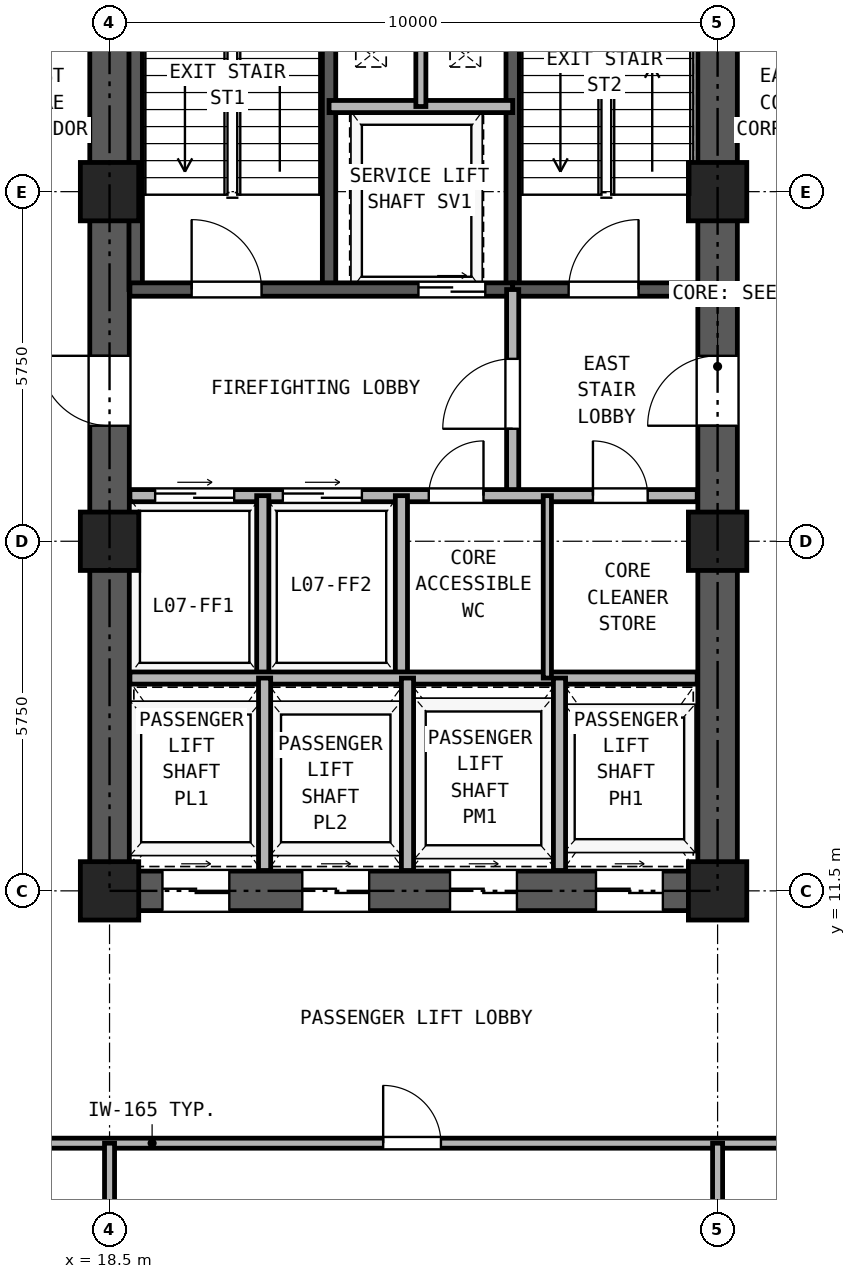
"""IFC4 building model, lengths in metres.
Left out: names, types, materials, properties, quantities, classifications, styles, units other than length and angle.
Written with IfcOpenShell. Run it as: python <this file> out.ifc"""

import sys

from ifc_helpers import new_model, si_unit, direction, frame, frame_2d, origin, origin_2d, place, context, subcontext, project, spatial, rectangle, hollow_rectangle, extrude, source, transform, mapped, element, fill, save


model = new_model("IFC4")
c1 = context("Model", 3, precision=1e-05, world=origin(), true_north=direction((0.0, 1.0)))
c2 = subcontext(c1, "Body", "Model", "MODEL_VIEW")
j1 = project(units=[si_unit("LENGTHUNIT", "METRE"), si_unit("PLANEANGLEUNIT", "RADIAN")], contexts=[c1])
p1 = place(None, origin())
s1 = spatial("IfcSite", under=j1, at=p1, CompositionType="ELEMENT")
p2 = place(p1, origin())
s2 = spatial("IfcBuilding", under=s1, at=p2, CompositionType="ELEMENT")
p3 = place(p2, frame((0.0, 0.0, 29.7)))
s3 = spatial("IfcBuildingStorey", under=s2, at=p3, CompositionType="ELEMENT", Elevation=29.7)
m1 = source(origin(), c2, "Body", "SweptSolid", [
    extrude(hollow_rectangle(XDim=0.96, YDim=0.96, WallThickness=0.06, at=origin_2d()), origin(), (0.0, 0.0, 1.0), 3.32),
])
for number, where, z_axis, x_axis in (
    (1, (18.5, 11.5, 0.0), (0.0, 0.0, 1.0), (1.0, 0.0, 0.0)),
    (2, (18.5, 17.25, 0.0), (0.0, 0.0, 1.0), (1.0, 0.0, 0.0)),
    (3, (18.5, 23.0, 0.0), (0.0, 0.0, 1.0), (1.0, 0.0, 0.0)),
    (4, (28.5, 11.5, 0.0), (0.0, 0.0, 1.0), (1.0, 0.0, 0.0)),
    (5, (28.5, 17.25, 0.0), (0.0, 0.0, 1.0), (1.0, 0.0, 0.0)),
    (6, (28.5, 23.0, 0.0), (0.0, 0.0, 1.0), (1.0, 0.0, 0.0)),
):
    element("IfcColumn", number, at=place(p3, frame(where, z_axis=z_axis, x_axis=x_axis)), inside=s3, PredefinedType="COLUMN", context=c2, shape_type="MappedRepresentation", body=[
        mapped(m1, transform((0.0, 0.0, 0.0), x_axis=(1.0, 0.0, 0.0), y_axis=(0.0, 1.0, 0.0), z_axis=(0.0, 0.0, 1.0), scale=1.0)),
    ])
p4 = place(p3, frame((18.175, 11.5, 0.0), z_axis=(0.0, 0.0, 1.0), x_axis=(1.0, 0.0, 0.0)))
e7 = element("IfcWall", 7, at=p4, inside=s3, PredefinedType="SHEAR", context=c2, shape_type="SweptSolid", body=[
    extrude(rectangle(XDim=10.65, YDim=0.65, at=frame_2d((5.325, 0.0))), origin(), (0.0, 0.0, 1.0), 3.32),
])
p5 = place(p4, frame((1.195, 0.0, 0.0)))
e8 = element("IfcOpeningElement", 8, at=p5, cuts=e7, PredefinedType="OPENING", context=c2, shape_type="SweptSolid", body=[
    extrude(rectangle(XDim=1.1, YDim=2.25, at=frame_2d((0.55, 1.125))), frame((0.0, 0.335, 0.0), z_axis=(0.0, -1.0, 0.0), x_axis=(1.0, 0.0, 0.0)), (0.0, 0.0, 1.0), 0.67),
])
p6 = place(p4, frame((3.495, 0.0, 0.0)))
e9 = element("IfcOpeningElement", 9, at=p6, cuts=e7, PredefinedType="OPENING", context=c2, shape_type="SweptSolid", body=[
    extrude(rectangle(XDim=1.1, YDim=2.25, at=frame_2d((0.55, 1.125))), frame((0.0, 0.335, 0.0), z_axis=(0.0, -1.0, 0.0), x_axis=(1.0, 0.0, 0.0)), (0.0, 0.0, 1.0), 0.67),
])
p7 = place(p4, frame((5.925, 0.0, 0.0)))
e10 = element("IfcOpeningElement", 10, at=p7, cuts=e7, PredefinedType="OPENING", context=c2, shape_type="SweptSolid", body=[
    extrude(rectangle(XDim=1.1, YDim=2.25, at=frame_2d((0.55, 1.125))), frame((0.0, 0.335, 0.0), z_axis=(0.0, -1.0, 0.0), x_axis=(1.0, 0.0, 0.0)), (0.0, 0.0, 1.0), 0.67),
])
p8 = place(p4, frame((8.325, 0.0, 0.0)))
e11 = element("IfcOpeningElement", 11, at=p8, cuts=e7, PredefinedType="OPENING", context=c2, shape_type="SweptSolid", body=[
    extrude(rectangle(XDim=1.1, YDim=2.25, at=frame_2d((0.55, 1.125))), frame((0.0, 0.335, 0.0), z_axis=(0.0, -1.0, 0.0), x_axis=(1.0, 0.0, 0.0)), (0.0, 0.0, 1.0), 0.67),
])
p9 = place(p3, frame((18.5, 11.825, 0.0), z_axis=(0.0, 0.0, 1.0), x_axis=(0.0, 1.0, 0.0)))
e12 = element("IfcWall", 12, at=p9, inside=s3, PredefinedType="SHEAR", context=c2, shape_type="SweptSolid", body=[
    extrude(rectangle(XDim=16.6, YDim=0.65, at=frame_2d((8.3, 0.0))), origin(), (0.0, 0.0, 1.0), 3.32),
])
p10 = place(p9, frame((7.325, 0.0, 0.0)))
e13 = element("IfcOpeningElement", 13, at=p10, cuts=e12, PredefinedType="OPENING", context=c2, shape_type="SweptSolid", body=[
    extrude(rectangle(XDim=1.15, YDim=2.2, at=frame_2d((0.575, 1.1))), frame((0.0, 0.335, 0.0), z_axis=(0.0, -1.0, 0.0), x_axis=(1.0, 0.0, 0.0)), (0.0, 0.0, 1.0), 0.67),
])
p11 = place(p3, frame((28.5, 11.825, 0.0), z_axis=(0.0, 0.0, 1.0), x_axis=(0.0, 1.0, 0.0)))
e14 = element("IfcWall", 14, at=p11, inside=s3, PredefinedType="SHEAR", context=c2, shape_type="SweptSolid", body=[
    extrude(rectangle(XDim=16.6, YDim=0.65, at=frame_2d((8.3, 0.0))), origin(), (0.0, 0.0, 1.0), 3.32),
])
p12 = place(p11, frame((7.325, 0.0, 0.0)))
e15 = element("IfcOpeningElement", 15, at=p12, cuts=e14, PredefinedType="OPENING", context=c2, shape_type="SweptSolid", body=[
    extrude(rectangle(XDim=1.15, YDim=2.2, at=frame_2d((0.575, 1.1))), frame((0.0, 0.335, 0.0), z_axis=(0.0, -1.0, 0.0), x_axis=(1.0, 0.0, 0.0)), (0.0, 0.0, 1.0), 0.67),
])
for number, where, z_axis, x_axis in (
    (16, (18.93, 21.39, 0.0), (0.0, 0.0, 1.0), (0.0, 1.0, 0.0)),
    (17, (22.11, 21.39, 0.0), (0.0, 0.0, 1.0), (0.0, 1.0, 0.0)),
    (18, (25.13, 21.39, 0.0), (0.0, 0.0, 1.0), (0.0, 1.0, 0.0)),
):
    element("IfcWall", number, at=place(p3, frame(where, z_axis=z_axis, x_axis=x_axis)), inside=s3, PredefinedType="SOLIDWALL", context=c2, shape_type="SweptSolid", body=[
        extrude(rectangle(XDim=7.11, YDim=0.22, at=frame_2d((3.555, 0.0))), origin(), (0.0, 0.0, 1.0), 3.32),
    ])
p13 = place(p3, frame((18.835, 21.39, 0.0), z_axis=(0.0, 0.0, 1.0), x_axis=(1.0, 0.0, 0.0)))
e19 = element("IfcWall", 19, at=p13, inside=s3, PredefinedType="SOLIDWALL", context=c2, shape_type="SweptSolid", body=[
    extrude(rectangle(XDim=6.295, YDim=0.22, at=frame_2d((3.147, 0.0))), origin(), (0.0, 0.0, 1.0), 3.32),
])
p14 = place(p13, frame((1.015, 0.0, 0.0)))
e20 = element("IfcOpeningElement", 20, at=p14, cuts=e19, PredefinedType="OPENING", context=c2, shape_type="SweptSolid", body=[
    extrude(rectangle(XDim=1.15, YDim=2.2, at=frame_2d((0.575, 1.1))), frame((0.0, 0.12, 0.0), z_axis=(0.0, -1.0, 0.0), x_axis=(1.0, 0.0, 0.0)), (0.0, 0.0, 1.0), 0.24),
])
p15 = place(p13, frame((4.745, 0.0, 0.0)))
e21 = element("IfcOpeningElement", 21, at=p15, cuts=e19, PredefinedType="OPENING", context=c2, shape_type="SweptSolid", body=[
    extrude(rectangle(XDim=1.1, YDim=2.25, at=frame_2d((0.55, 1.125))), frame((0.0, 0.12, 0.0), z_axis=(0.0, -1.0, 0.0), x_axis=(1.0, 0.0, 0.0)), (0.0, 0.0, 1.0), 0.24),
])
p16 = place(p3, frame((25.13, 21.39, 0.0), z_axis=(0.0, 0.0, 1.0), x_axis=(1.0, 0.0, 0.0)))
e22 = element("IfcWall", 22, at=p16, inside=s3, PredefinedType="SOLIDWALL", context=c2, shape_type="SweptSolid", body=[
    extrude(rectangle(XDim=3.035, YDim=0.22, at=frame_2d((1.518, 0.0))), origin(), (0.0, 0.0, 1.0), 3.32),
])
p17 = place(p16, frame((0.92, 0.0, 0.0)))
e23 = element("IfcOpeningElement", 23, at=p17, cuts=e22, PredefinedType="OPENING", context=c2, shape_type="SweptSolid", body=[
    extrude(rectangle(XDim=1.15, YDim=2.2, at=frame_2d((0.575, 1.1))), frame((0.0, 0.12, 0.0), z_axis=(0.0, -1.0, 0.0), x_axis=(1.0, 0.0, 0.0)), (0.0, 0.0, 1.0), 0.24),
])
p18 = place(p3, frame((22.11, 24.4, 0.0), z_axis=(0.0, 0.0, 1.0), x_axis=(1.0, 0.0, 0.0)))
e24 = element("IfcWall", 24, at=p18, inside=s3, PredefinedType="PARTITIONING", context=c2, shape_type="SweptSolid", body=[
    extrude(rectangle(XDim=3.02, YDim=0.2, at=frame_2d((1.51, 0.0))), origin(), (0.0, 0.0, 1.0), 3.32),
])
p19 = place(p3, frame((23.62, 24.4, 0.0), z_axis=(0.0, 0.0, 1.0), x_axis=(0.0, 1.0, 0.0)))
e25 = element("IfcWall", 25, at=p19, inside=s3, PredefinedType="PARTITIONING", context=c2, shape_type="SweptSolid", body=[
    extrude(rectangle(XDim=4.015, YDim=0.165, at=frame_2d((2.008, 0.0))), origin(), (0.0, 0.0, 1.0), 3.32),
])
p20 = place(p3, frame((25.13, 18.0, 0.0), z_axis=(0.0, 0.0, 1.0), x_axis=(0.0, 1.0, 0.0)))
e26 = element("IfcWall", 26, at=p20, inside=s3, PredefinedType="PARTITIONING", context=c2, shape_type="SweptSolid", body=[
    extrude(rectangle(XDim=3.39, YDim=0.2, at=frame_2d((1.695, 0.0))), origin(), (0.0, 0.0, 1.0), 3.32),
])
p21 = place(p20, frame((1.1, 0.0, 0.0)))
e27 = element("IfcOpeningElement", 27, at=p21, cuts=e26, PredefinedType="OPENING", context=c2, shape_type="SweptSolid", body=[
    extrude(rectangle(XDim=1.15, YDim=2.2, at=frame_2d((0.575, 1.1))), frame((0.0, 0.11, 0.0), z_axis=(0.0, -1.0, 0.0), x_axis=(1.0, 0.0, 0.0)), (0.0, 0.0, 1.0), 0.22),
])
p22 = place(p3, frame((18.835, 18.0, 0.0), z_axis=(0.0, 0.0, 1.0), x_axis=(1.0, 0.0, 0.0)))
e28 = element("IfcWall", 28, at=p22, inside=s3, PredefinedType="PARTITIONING", context=c2, shape_type="SweptSolid", body=[
    extrude(rectangle(XDim=9.33, YDim=0.2, at=frame_2d((4.665, 0.0))), origin(), (0.0, 0.0, 1.0), 3.32),
])
p23 = place(p22, frame((0.415, 0.0, 0.0)))
e29 = element("IfcOpeningElement", 29, at=p23, cuts=e28, PredefinedType="OPENING", context=c2, shape_type="SweptSolid", body=[
    extrude(rectangle(XDim=1.3, YDim=2.3, at=frame_2d((0.65, 1.15))), frame((0.0, 0.11, 0.0), z_axis=(0.0, -1.0, 0.0), x_axis=(1.0, 0.0, 0.0)), (0.0, 0.0, 1.0), 0.22),
])
p24 = place(p22, frame((2.515, 0.0, 0.0)))
e30 = element("IfcOpeningElement", 30, at=p24, cuts=e28, PredefinedType="OPENING", context=c2, shape_type="SweptSolid", body=[
    extrude(rectangle(XDim=1.3, YDim=2.3, at=frame_2d((0.65, 1.15))), frame((0.0, 0.11, 0.0), z_axis=(0.0, -1.0, 0.0), x_axis=(1.0, 0.0, 0.0)), (0.0, 0.0, 1.0), 0.22),
])
p25 = place(p22, frame((4.915, 0.0, 0.0)))
e31 = element("IfcOpeningElement", 31, at=p25, cuts=e28, PredefinedType="OPENING", context=c2, shape_type="SweptSolid", body=[
    extrude(rectangle(XDim=0.9, YDim=2.05, at=frame_2d((0.45, 1.025))), frame((0.0, 0.11, 0.0), z_axis=(0.0, -1.0, 0.0), x_axis=(1.0, 0.0, 0.0)), (0.0, 0.0, 1.0), 0.22),
])
p26 = place(p22, frame((7.615, 0.0, 0.0)))
e32 = element("IfcOpeningElement", 32, at=p26, cuts=e28, PredefinedType="OPENING", context=c2, shape_type="SweptSolid", body=[
    extrude(rectangle(XDim=0.9, YDim=2.05, at=frame_2d((0.45, 1.025))), frame((0.0, 0.11, 0.0), z_axis=(0.0, -1.0, 0.0), x_axis=(1.0, 0.0, 0.0)), (0.0, 0.0, 1.0), 0.22),
])
for number, where, z_axis, x_axis in (
    (33, (21.02, 15.0, 0.0), (0.0, 0.0, 1.0), (0.0, 1.0, 0.0)),
    (34, (23.3, 15.0, 0.0), (0.0, 0.0, 1.0), (0.0, 1.0, 0.0)),
):
    element("IfcWall", number, at=place(p3, frame(where, z_axis=z_axis, x_axis=x_axis)), inside=s3, PredefinedType="PARTITIONING", context=c2, shape_type="SweptSolid", body=[
        extrude(rectangle(XDim=3.0, YDim=0.2, at=frame_2d((1.5, 0.0))), origin(), (0.0, 0.0, 1.0), 3.32),
    ])
p27 = place(p3, frame((18.835, 15.0, 0.0), z_axis=(0.0, 0.0, 1.0), x_axis=(1.0, 0.0, 0.0)))
e35 = element("IfcWall", 35, at=p27, inside=s3, PredefinedType="PARTITIONING", context=c2, shape_type="SweptSolid", body=[
    extrude(rectangle(XDim=9.33, YDim=0.2, at=frame_2d((4.665, 0.0))), origin(), (0.0, 0.0, 1.0), 3.32),
])
p28 = place(p3, frame((25.7, 15.0, 0.0), z_axis=(0.0, 0.0, 1.0), x_axis=(0.0, 1.0, 0.0)))
e36 = element("IfcWall", 36, at=p28, inside=s3, PredefinedType="PARTITIONING", context=c2, shape_type="SweptSolid", body=[
    extrude(rectangle(XDim=3.0, YDim=0.135, at=frame_2d((1.5, 0.0))), origin(), (0.0, 0.0, 1.0), 3.32),
])
for number, where, z_axis, x_axis in (
    (37, (21.05, 11.835, 0.0), (0.0, 0.0, 1.0), (0.0, 1.0, 0.0)),
    (38, (23.4, 11.835, 0.0), (0.0, 0.0, 1.0), (0.0, 1.0, 0.0)),
    (39, (25.9, 11.835, 0.0), (0.0, 0.0, 1.0), (0.0, 1.0, 0.0)),
):
    element("IfcWall", number, at=place(p3, frame(where, z_axis=z_axis, x_axis=x_axis)), inside=s3, PredefinedType="PARTITIONING", context=c2, shape_type="SweptSolid", body=[
        extrude(rectangle(XDim=3.165, YDim=0.2, at=frame_2d((1.583, 0.0))), origin(), (0.0, 0.0, 1.0), 3.32),
    ])
p29 = place(p3, frame((11.4, 7.35, 0.0), z_axis=(0.0, 0.0, 1.0), x_axis=(1.0, 0.0, 0.0)))
e40 = element("IfcWall", 40, at=p29, inside=s3, PredefinedType="PARTITIONING", context=c2, shape_type="SweptSolid", body=[
    extrude(rectangle(XDim=24.2, YDim=0.165, at=frame_2d((12.1, 0.0))), origin(), (0.0, 0.0, 1.0), 3.32),
])
p30 = place(p29, frame((3.05, 0.0, 0.0)))
e41 = element("IfcOpeningElement", 41, at=p30, cuts=e40, PredefinedType="OPENING", context=c2, shape_type="SweptSolid", body=[
    extrude(rectangle(XDim=0.95, YDim=2.15, at=frame_2d((0.475, 1.075))), frame((0.0, 0.093, 0.0), z_axis=(0.0, -1.0, 0.0), x_axis=(1.0, 0.0, 0.0)), (0.0, 0.0, 1.0), 0.185),
])
p31 = place(p29, frame((11.6, 0.0, 0.0)))
e42 = element("IfcOpeningElement", 42, at=p31, cuts=e40, PredefinedType="OPENING", context=c2, shape_type="SweptSolid", body=[
    extrude(rectangle(XDim=0.95, YDim=2.15, at=frame_2d((0.475, 1.075))), frame((0.0, 0.093, 0.0), z_axis=(0.0, -1.0, 0.0), x_axis=(1.0, 0.0, 0.0)), (0.0, 0.0, 1.0), 0.185),
])
p32 = place(p29, frame((18.8, 0.0, 0.0)))
e43 = element("IfcOpeningElement", 43, at=p32, cuts=e40, PredefinedType="OPENING", context=c2, shape_type="SweptSolid", body=[
    extrude(rectangle(XDim=0.92, YDim=2.1, at=frame_2d((0.46, 1.05))), frame((0.0, 0.093, 0.0), z_axis=(0.0, -1.0, 0.0), x_axis=(1.0, 0.0, 0.0)), (0.0, 0.0, 1.0), 0.185),
])
p33 = place(p29, frame((22.35, 0.0, 0.0)))
e44 = element("IfcOpeningElement", 44, at=p33, cuts=e40, PredefinedType="OPENING", context=c2, shape_type="SweptSolid", body=[
    extrude(rectangle(XDim=0.92, YDim=2.1, at=frame_2d((0.46, 1.05))), frame((0.0, 0.093, 0.0), z_axis=(0.0, -1.0, 0.0), x_axis=(1.0, 0.0, 0.0)), (0.0, 0.0, 1.0), 0.185),
])
for number, where, z_axis, x_axis in (
    (45, (18.5, 0.16, 0.0), (0.0, 0.0, 1.0), (0.0, 1.0, 0.0)),
    (46, (28.5, 0.16, 0.0), (0.0, 0.0, 1.0), (0.0, 1.0, 0.0)),
):
    element("IfcWall", number, at=place(p3, frame(where, z_axis=z_axis, x_axis=x_axis)), inside=s3, PredefinedType="PARTITIONING", context=c2, shape_type="SweptSolid", body=[
        extrude(rectangle(XDim=7.19, YDim=0.165, at=frame_2d((3.595, 0.0))), origin(), (0.0, 0.0, 1.0), 2.539),
    ])
p34 = place(p14, frame((1.15, 0.0, 0.0), z_axis=(0.0, 0.0, 1.0), x_axis=(-1.0, 0.0, 0.0)))
e47 = element("IfcDoor", 47, at=p34, inside=s3, OperationType="SINGLE_SWING_LEFT", PredefinedType="DOOR", context=c2, shape_type="SweptSolid", body=[
    extrude(rectangle(XDim=1.15, YDim=2.2, at=frame_2d((0.575, 1.1))), frame((0.0, 0.025, 0.0), z_axis=(0.0, -1.0, 0.0), x_axis=(1.0, 0.0, 0.0)), (0.0, 0.0, 1.0), 0.05),
])
fill(e20, e47)
p35 = place(p17, frame((1.15, 0.0, 0.0), z_axis=(0.0, 0.0, 1.0), x_axis=(-1.0, 0.0, 0.0)))
e48 = element("IfcDoor", 48, at=p35, inside=s3, OperationType="SINGLE_SWING_RIGHT", PredefinedType="DOOR", context=c2, shape_type="SweptSolid", body=[
    extrude(rectangle(XDim=1.15, YDim=2.2, at=frame_2d((0.575, 1.1))), frame((0.0, 0.025, 0.0), z_axis=(0.0, -1.0, 0.0), x_axis=(1.0, 0.0, 0.0)), (0.0, 0.0, 1.0), 0.05),
])
fill(e23, e48)
p36 = place(p15, frame((1.1, 0.0, 0.0), z_axis=(0.0, 0.0, 1.0), x_axis=(-1.0, 0.0, 0.0)))
e49 = element("IfcDoor", 49, at=p36, inside=s3, OperationType="DOUBLE_DOOR_SLIDING", PredefinedType="DOOR", context=c2, shape_type="SweptSolid", body=[
    extrude(rectangle(XDim=1.1, YDim=2.25, at=frame_2d((0.55, 1.125))), frame((0.0, 0.025, 0.0), z_axis=(0.0, -1.0, 0.0), x_axis=(1.0, 0.0, 0.0)), (0.0, 0.0, 1.0), 0.05),
])
fill(e21, e49)
p37 = place(p21, origin())
e50 = element("IfcDoor", 50, at=p37, inside=s3, OperationType="SINGLE_SWING_LEFT", PredefinedType="DOOR", context=c2, shape_type="SweptSolid", body=[
    extrude(rectangle(XDim=1.15, YDim=2.2, at=frame_2d((0.575, 1.1))), frame((0.0, 0.025, 0.0), z_axis=(0.0, -1.0, 0.0), x_axis=(1.0, 0.0, 0.0)), (0.0, 0.0, 1.0), 0.05),
])
fill(e27, e50)
p38 = place(p23, origin())
e51 = element("IfcDoor", 51, at=p38, inside=s3, OperationType="DOUBLE_DOOR_SLIDING", PredefinedType="DOOR", context=c2, shape_type="SweptSolid", body=[
    extrude(rectangle(XDim=1.3, YDim=2.3, at=frame_2d((0.65, 1.15))), frame((0.0, 0.025, 0.0), z_axis=(0.0, -1.0, 0.0), x_axis=(1.0, 0.0, 0.0)), (0.0, 0.0, 1.0), 0.05),
])
fill(e29, e51)
p39 = place(p24, origin())
e52 = element("IfcDoor", 52, at=p39, inside=s3, OperationType="DOUBLE_DOOR_SLIDING", PredefinedType="DOOR", context=c2, shape_type="SweptSolid", body=[
    extrude(rectangle(XDim=1.3, YDim=2.3, at=frame_2d((0.65, 1.15))), frame((0.0, 0.025, 0.0), z_axis=(0.0, -1.0, 0.0), x_axis=(1.0, 0.0, 0.0)), (0.0, 0.0, 1.0), 0.05),
])
fill(e30, e52)
p40 = place(p25, frame((0.9, 0.0, 0.0), z_axis=(0.0, 0.0, 1.0), x_axis=(-1.0, 0.0, 0.0)))
e53 = element("IfcDoor", 53, at=p40, inside=s3, OperationType="SINGLE_SWING_RIGHT", PredefinedType="DOOR", context=c2, shape_type="SweptSolid", body=[
    extrude(rectangle(XDim=0.9, YDim=2.05, at=frame_2d((0.45, 1.025))), frame((0.0, 0.025, 0.0), z_axis=(0.0, -1.0, 0.0), x_axis=(1.0, 0.0, 0.0)), (0.0, 0.0, 1.0), 0.05),
])
fill(e31, e53)
p41 = place(p26, frame((0.9, 0.0, 0.0), z_axis=(0.0, 0.0, 1.0), x_axis=(-1.0, 0.0, 0.0)))
e54 = element("IfcDoor", 54, at=p41, inside=s3, OperationType="SINGLE_SWING_LEFT", PredefinedType="DOOR", context=c2, shape_type="SweptSolid", body=[
    extrude(rectangle(XDim=0.9, YDim=2.05, at=frame_2d((0.45, 1.025))), frame((0.0, 0.025, 0.0), z_axis=(0.0, -1.0, 0.0), x_axis=(1.0, 0.0, 0.0)), (0.0, 0.0, 1.0), 0.05),
])
fill(e32, e54)
p42 = place(p10, frame((1.15, 0.0, 0.0), z_axis=(0.0, 0.0, 1.0), x_axis=(-1.0, 0.0, 0.0)))
e55 = element("IfcDoor", 55, at=p42, inside=s3, OperationType="SINGLE_SWING_RIGHT", PredefinedType="DOOR", context=c2, shape_type="SweptSolid", body=[
    extrude(rectangle(XDim=1.15, YDim=2.2, at=frame_2d((0.575, 1.1))), frame((0.0, 0.025, 0.0), z_axis=(0.0, -1.0, 0.0), x_axis=(1.0, 0.0, 0.0)), (0.0, 0.0, 1.0), 0.05),
])
fill(e13, e55)
p43 = place(p12, origin())
e56 = element("IfcDoor", 56, at=p43, inside=s3, OperationType="SINGLE_SWING_LEFT", PredefinedType="DOOR", context=c2, shape_type="SweptSolid", body=[
    extrude(rectangle(XDim=1.15, YDim=2.2, at=frame_2d((0.575, 1.1))), frame((0.0, 0.025, 0.0), z_axis=(0.0, -1.0, 0.0), x_axis=(1.0, 0.0, 0.0)), (0.0, 0.0, 1.0), 0.05),
])
fill(e15, e56)
p44 = place(p5, frame((1.1, 0.0, 0.0), z_axis=(0.0, 0.0, 1.0), x_axis=(-1.0, 0.0, 0.0)))
e57 = element("IfcDoor", 57, at=p44, inside=s3, OperationType="DOUBLE_DOOR_SLIDING", PredefinedType="DOOR", context=c2, shape_type="SweptSolid", body=[
    extrude(rectangle(XDim=1.1, YDim=2.25, at=frame_2d((0.55, 1.125))), frame((0.0, 0.025, 0.0), z_axis=(0.0, -1.0, 0.0), x_axis=(1.0, 0.0, 0.0)), (0.0, 0.0, 1.0), 0.05),
])
fill(e8, e57)
p45 = place(p6, frame((1.1, 0.0, 0.0), z_axis=(0.0, 0.0, 1.0), x_axis=(-1.0, 0.0, 0.0)))
e58 = element("IfcDoor", 58, at=p45, inside=s3, OperationType="DOUBLE_DOOR_SLIDING", PredefinedType="DOOR", context=c2, shape_type="SweptSolid", body=[
    extrude(rectangle(XDim=1.1, YDim=2.25, at=frame_2d((0.55, 1.125))), frame((0.0, 0.025, 0.0), z_axis=(0.0, -1.0, 0.0), x_axis=(1.0, 0.0, 0.0)), (0.0, 0.0, 1.0), 0.05),
])
fill(e9, e58)
p46 = place(p7, frame((1.1, 0.0, 0.0), z_axis=(0.0, 0.0, 1.0), x_axis=(-1.0, 0.0, 0.0)))
e59 = element("IfcDoor", 59, at=p46, inside=s3, OperationType="DOUBLE_DOOR_SLIDING", PredefinedType="DOOR", context=c2, shape_type="SweptSolid", body=[
    extrude(rectangle(XDim=1.1, YDim=2.25, at=frame_2d((0.55, 1.125))), frame((0.0, 0.025, 0.0), z_axis=(0.0, -1.0, 0.0), x_axis=(1.0, 0.0, 0.0)), (0.0, 0.0, 1.0), 0.05),
])
fill(e10, e59)
p47 = place(p8, frame((1.1, 0.0, 0.0), z_axis=(0.0, 0.0, 1.0), x_axis=(-1.0, 0.0, 0.0)))
e60 = element("IfcDoor", 60, at=p47, inside=s3, OperationType="DOUBLE_DOOR_SLIDING", PredefinedType="DOOR", context=c2, shape_type="SweptSolid", body=[
    extrude(rectangle(XDim=1.1, YDim=2.25, at=frame_2d((0.55, 1.125))), frame((0.0, 0.025, 0.0), z_axis=(0.0, -1.0, 0.0), x_axis=(1.0, 0.0, 0.0)), (0.0, 0.0, 1.0), 0.05),
])
fill(e11, e60)
p48 = place(p31, frame((0.95, 0.0, 0.0), z_axis=(0.0, 0.0, 1.0), x_axis=(-1.0, 0.0, 0.0)))
e61 = element("IfcDoor", 61, at=p48, inside=s3, OperationType="SINGLE_SWING_LEFT", PredefinedType="DOOR", context=c2, shape_type="SweptSolid", body=[
    extrude(rectangle(XDim=0.95, YDim=2.15, at=frame_2d((0.475, 1.075))), frame((0.0, 0.025, 0.0), z_axis=(0.0, -1.0, 0.0), x_axis=(1.0, 0.0, 0.0)), (0.0, 0.0, 1.0), 0.05),
])
fill(e42, e61)
save(model, sys.argv[1])
